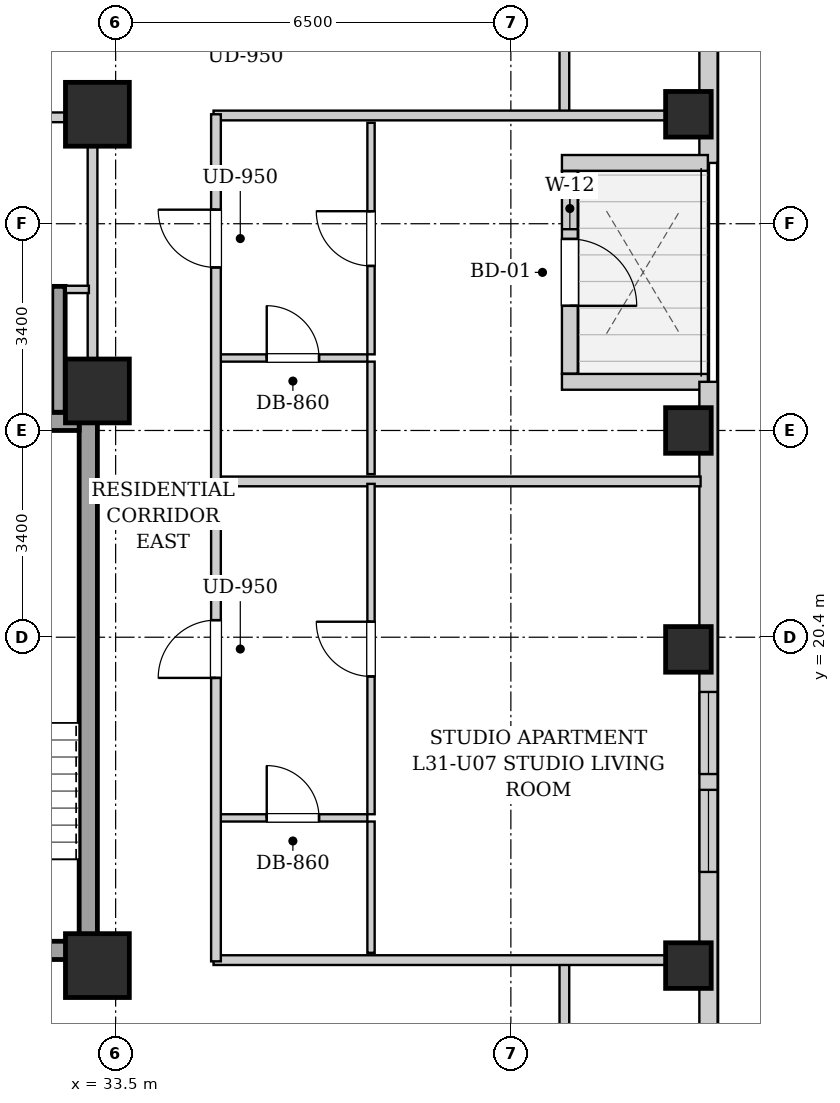
"""IFC4 building model, lengths in metres.
Left out: names, types, materials, properties, quantities, classifications, styles, units other than length and angle.
Written with IfcOpenShell. Run it as: python <this file> out.ifc"""

import sys

from ifc_helpers import new_model, si_unit, direction, frame, frame_2d, origin, origin_2d, place, context, subcontext, project, spatial, rectangle, extrude, element, fill, save


model = new_model("IFC4")
c1 = context("Model", 3, precision=1e-05, world=origin(), true_north=direction((0.0, 1.0)))
c2 = subcontext(c1, "Body", "Model", "MODEL_VIEW")
j1 = project(units=[si_unit("LENGTHUNIT", "METRE"), si_unit("PLANEANGLEUNIT", "RADIAN")], contexts=[c1])
p1 = place(None, origin())
s1 = spatial("IfcSite", under=j1, at=p1, CompositionType="ELEMENT")
p2 = place(p1, origin())
s2 = spatial("IfcBuilding", under=s1, at=p2, CompositionType="ELEMENT")
p3 = place(p2, frame((0.0, 0.0, 110.3)))
s3 = spatial("IfcBuildingStorey", under=s2, at=p3, CompositionType="ELEMENT", Elevation=110.3)
for number, where, z_axis, x_axis in (
    (1, (42.92, 15.0, 0.0), (0.0, 0.0, 1.0), (1.0, 0.0, 0.0)),
    (2, (42.92, 20.2, 0.0), (0.0, 0.0, 1.0), (1.0, 0.0, 0.0)),
    (3, (42.92, 23.8, 0.0), (0.0, 0.0, 1.0), (1.0, 0.0, 0.0)),
    (4, (42.92, 29.0, 0.0), (0.0, 0.0, 1.0), (1.0, 0.0, 0.0)),
):
    element("IfcColumn", number, at=place(p3, frame(where, z_axis=z_axis, x_axis=x_axis)), inside=s3, PredefinedType="COLUMN", context=c2, shape_type="SweptSolid", body=[
        extrude(rectangle(XDim=0.75, YDim=0.75, at=origin_2d()), origin(), (0.0, 0.0, 1.0), 3.2),
    ])
for number, where, z_axis, x_axis in (
    (5, (33.2, 15.0, 0.0), (0.0, 0.0, 1.0), (1.0, 0.0, 0.0)),
    (6, (33.2, 29.0, 0.0), (0.0, 0.0, 1.0), (1.0, 0.0, 0.0)),
    (7, (33.2, 24.45, 0.0), (0.0, 0.0, 1.0), (1.0, 0.0, 0.0)),
):
    element("IfcColumn", number, at=place(p3, frame(where, z_axis=z_axis, x_axis=x_axis)), inside=s3, PredefinedType="COLUMN", context=c2, shape_type="SweptSolid", body=[
        extrude(rectangle(XDim=1.05, YDim=1.05, at=origin_2d()), origin(), (0.0, 0.0, 1.0), 3.2),
    ])
p4 = place(p3, frame((43.25, 40.8, 0.0), z_axis=(0.0, 0.0, 1.0), x_axis=(0.0, -1.0, 0.0)))
e8 = element("IfcWall", 8, at=p4, inside=s3, PredefinedType="SOLIDWALL", context=c2, shape_type="SweptSolid", body=[
    extrude(rectangle(XDim=12.6, YDim=0.3, at=frame_2d((6.3, 0.0))), origin(), (0.0, 0.0, 1.0), 2.94),
])
p5 = place(p3, frame((43.24, 28.2, 0.0), z_axis=(0.0, 0.0, 1.0), x_axis=(-1.0, 0.0, 0.0)))
e9 = element("IfcWall", 9, at=p5, inside=s3, PredefinedType="SOLIDWALL", context=c2, shape_type="SweptSolid", body=[
    extrude(rectangle(XDim=2.4, YDim=0.26, at=frame_2d((1.2, 0.0))), origin(), (0.0, 0.0, 1.0), 2.94),
])
p6 = place(p3, frame((40.97, 28.066, 0.0), z_axis=(0.0, 0.0, 1.0), x_axis=(0.0, -1.0, 0.0)))
e10 = element("IfcWall", 10, at=p6, inside=s3, PredefinedType="SOLIDWALL", context=c2, shape_type="SweptSolid", body=[
    extrude(rectangle(XDim=3.332, YDim=0.26, at=frame_2d((1.666, 0.0))), origin(), (0.0, 0.0, 1.0), 2.94),
])
p7 = place(p6, frame((1.116, 0.0, 0.0)))
e11 = element("IfcOpeningElement", 11, at=p7, cuts=e10, PredefinedType="OPENING", context=c2, shape_type="SweptSolid", body=[
    extrude(rectangle(XDim=1.1, YDim=2.0, at=frame_2d((0.55, 1.0))), frame((0.0, 0.14, 0.0), z_axis=(0.0, -1.0, 0.0), x_axis=(1.0, 0.0, 0.0)), (0.0, 0.0, 1.0), 0.28),
])
p8 = place(p6, frame((0.276, 0.0, 0.55)))
e12 = element("IfcOpeningElement", 12, at=p8, cuts=e10, PredefinedType="OPENING", context=c2, shape_type="SweptSolid", body=[
    extrude(rectangle(XDim=0.68, YDim=1.2, at=frame_2d((0.34, 0.6))), frame((0.0, 0.14, 0.0), z_axis=(0.0, -1.0, 0.0), x_axis=(1.0, 0.0, 0.0)), (0.0, 0.0, 1.0), 0.28),
])
p9 = place(p3, frame((40.84, 24.6, 0.0), z_axis=(0.0, 0.0, 1.0), x_axis=(1.0, 0.0, 0.0)))
e13 = element("IfcWall", 13, at=p9, inside=s3, PredefinedType="SOLIDWALL", context=c2, shape_type="SweptSolid", body=[
    extrude(rectangle(XDim=2.4, YDim=0.26, at=frame_2d((1.2, 0.0))), origin(), (0.0, 0.0, 1.0), 2.94),
])
p10 = place(p3, frame((43.25, 24.6, 0.0), z_axis=(0.0, 0.0, 1.0), x_axis=(0.0, -1.0, 0.0)))
e14 = element("IfcWall", 14, at=p10, inside=s3, PredefinedType="SOLIDWALL", context=c2, shape_type="SweptSolid", body=[
    extrude(rectangle(XDim=22.1, YDim=0.3, at=frame_2d((11.05, 0.0))), origin(), (0.0, 0.0, 1.0), 2.94),
])
p11 = place(p10, frame((17.366, 0.0, 0.55)))
e15 = element("IfcOpeningElement", 15, at=p11, cuts=e14, PredefinedType="OPENING", context=c2, shape_type="SweptSolid", body=[
    extrude(rectangle(XDim=1.35, YDim=1.2, at=frame_2d((0.675, 0.6))), frame((0.0, 0.16, 0.0), z_axis=(0.0, -1.0, 0.0), x_axis=(1.0, 0.0, 0.0)), (0.0, 0.0, 1.0), 0.32),
])
p12 = place(p10, frame((15.535, 0.0, 0.55)))
e16 = element("IfcOpeningElement", 16, at=p12, cuts=e14, PredefinedType="OPENING", context=c2, shape_type="SweptSolid", body=[
    extrude(rectangle(XDim=1.35, YDim=1.2, at=frame_2d((0.675, 0.6))), frame((0.0, 0.16, 0.0), z_axis=(0.0, -1.0, 0.0), x_axis=(1.0, 0.0, 0.0)), (0.0, 0.0, 1.0), 0.32),
])
p13 = place(p10, frame((5.1, 0.0, 0.55)))
e17 = element("IfcOpeningElement", 17, at=p13, cuts=e14, PredefinedType="OPENING", context=c2, shape_type="SweptSolid", body=[
    extrude(rectangle(XDim=1.35, YDim=1.2, at=frame_2d((0.675, 0.6))), frame((0.0, 0.16, 0.0), z_axis=(0.0, -1.0, 0.0), x_axis=(1.0, 0.0, 0.0)), (0.0, 0.0, 1.0), 0.32),
])
p14 = place(p10, frame((6.71, 0.0, 0.55)))
e18 = element("IfcOpeningElement", 18, at=p14, cuts=e14, PredefinedType="OPENING", context=c2, shape_type="SweptSolid", body=[
    extrude(rectangle(XDim=1.35, YDim=1.2, at=frame_2d((0.675, 0.6))), frame((0.0, 0.16, 0.0), z_axis=(0.0, -1.0, 0.0), x_axis=(1.0, 0.0, 0.0)), (0.0, 0.0, 1.0), 0.32),
])
p15 = place(p3, frame((33.05, 15.1, 0.0), z_axis=(0.0, 0.0, 1.0), x_axis=(0.0, 1.0, 0.0)))
e19 = element("IfcWall", 19, at=p15, inside=s3, PredefinedType="SHEAR", context=c2, shape_type="SweptSolid", body=[
    extrude(rectangle(XDim=9.0, YDim=0.3, at=frame_2d((4.5, 0.0))), origin(), (0.0, 0.0, 1.0), 2.94),
])
p16 = place(p3, frame((30.05, 23.95, 0.0), z_axis=(0.0, 0.0, 1.0), x_axis=(1.0, 0.0, 0.0)))
e20 = element("IfcWall", 20, at=p16, inside=s3, PredefinedType="SHEAR", context=c2, shape_type="SweptSolid", body=[
    extrude(rectangle(XDim=2.85, YDim=0.3, at=frame_2d((1.425, 0.0))), origin(), (0.0, 0.0, 1.0), 2.94),
])
p17 = place(p3, frame((30.05, 15.25, 0.0), z_axis=(0.0, 0.0, 1.0), x_axis=(1.0, 0.0, 0.0)))
e21 = element("IfcWall", 21, at=p17, inside=s3, PredefinedType="SHEAR", context=c2, shape_type="SweptSolid", body=[
    extrude(rectangle(XDim=2.85, YDim=0.3, at=frame_2d((1.425, 0.0))), origin(), (0.0, 0.0, 1.0), 2.94),
])
p18 = place(p17, frame((0.86, 0.0, 0.0)))
e22 = element("IfcOpeningElement", 22, at=p18, cuts=e21, PredefinedType="OPENING", context=c2, shape_type="SweptSolid", body=[
    extrude(rectangle(XDim=1.1, YDim=2.05, at=frame_2d((0.55, 1.025))), frame((0.0, 0.16, 0.0), z_axis=(0.0, -1.0, 0.0), x_axis=(1.0, 0.0, 0.0)), (0.0, 0.0, 1.0), 0.32),
])
p19 = place(p3, frame((32.56, 24.1, 0.0), z_axis=(0.0, 0.0, 1.0), x_axis=(0.0, 1.0, 0.0)))
e23 = element("IfcWall", 23, at=p19, inside=s3, PredefinedType="SHEAR", context=c2, shape_type="SweptSolid", body=[
    extrude(rectangle(XDim=2.07, YDim=0.22, at=frame_2d((1.035, 0.0))), origin(), (0.0, 0.0, 1.0), 2.94),
])
p20 = place(p3, frame((33.12, 24.12, 0.0), z_axis=(0.0, 0.0, 1.0), x_axis=(0.0, 1.0, 0.0)))
e24 = element("IfcWall", 24, at=p20, inside=s3, PredefinedType="PARTITIONING", context=c2, shape_type="SweptSolid", body=[
    extrude(rectangle(XDim=4.76, YDim=0.16, at=frame_2d((2.38, 0.0))), origin(), (0.0, 0.0, 1.0), 2.94),
])
p21 = place(p3, frame((32.68, 26.12, 0.0), z_axis=(0.0, 0.0, 1.0), x_axis=(1.0, 0.0, 0.0)))
e25 = element("IfcWall", 25, at=p21, inside=s3, PredefinedType="PARTITIONING", context=c2, shape_type="SweptSolid", body=[
    extrude(rectangle(XDim=0.38, YDim=0.12, at=frame_2d((0.19, 0.0))), origin(), (0.0, 0.0, 1.0), 2.94),
])
p22 = place(p3, frame((30.08, 28.95, 0.0), z_axis=(0.0, 0.0, 1.0), x_axis=(1.0, 0.0, 0.0)))
e26 = element("IfcWall", 26, at=p22, inside=s3, PredefinedType="PARTITIONING", context=c2, shape_type="SweptSolid", body=[
    extrude(rectangle(XDim=2.96, YDim=0.16, at=frame_2d((1.48, 0.0))), origin(), (0.0, 0.0, 1.0), 2.94),
])
p23 = place(p22, frame((0.695, 0.0, 0.0)))
e27 = element("IfcOpeningElement", 27, at=p23, cuts=e26, PredefinedType="OPENING", context=c2, shape_type="SweptSolid", body=[
    extrude(rectangle(XDim=0.86, YDim=2.05, at=frame_2d((0.43, 1.025))), frame((0.0, 0.09, 0.0), z_axis=(0.0, -1.0, 0.0), x_axis=(1.0, 0.0, 0.0)), (0.0, 0.0, 1.0), 0.18),
])
for number, where, z_axis, x_axis in (
    (28, (40.88, 13.35, 0.0), (0.0, 0.0, 1.0), (0.0, 1.0, 0.0)),
    (29, (40.88, 28.98, 0.0), (0.0, 0.0, 1.0), (0.0, 1.0, 0.0)),
):
    element("IfcWall", number, at=place(p3, frame(where, z_axis=z_axis, x_axis=x_axis)), inside=s3, PredefinedType="PARTITIONING", context=c2, shape_type="SweptSolid", body=[
        extrude(rectangle(XDim=1.74, YDim=0.16, at=frame_2d((0.87, 0.0))), origin(), (0.0, 0.0, 1.0), 2.94),
    ])
for number, where, z_axis, x_axis in (
    (30, (35.11, 15.09, 0.0), (0.0, 0.0, 1.0), (1.0, 0.0, 0.0)),
    (31, (35.11, 28.98, 0.0), (0.0, 0.0, 1.0), (1.0, 0.0, 0.0)),
):
    element("IfcWall", number, at=place(p3, frame(where, z_axis=z_axis, x_axis=x_axis)), inside=s3, PredefinedType="PARTITIONING", context=c2, shape_type="SweptSolid", body=[
        extrude(rectangle(XDim=8.01, YDim=0.16, at=frame_2d((4.005, 0.0))), origin(), (0.0, 0.0, 1.0), 2.313),
    ])
p24 = place(p3, frame((35.19, 22.962, 0.0), z_axis=(0.0, 0.0, 1.0), x_axis=(1.0, 0.0, 0.0)))
e32 = element("IfcWall", 32, at=p24, inside=s3, PredefinedType="PARTITIONING", context=c2, shape_type="SweptSolid", body=[
    extrude(rectangle(XDim=7.93, YDim=0.16, at=frame_2d((3.965, 0.0))), origin(), (0.0, 0.0, 1.0), 2.94),
])
p25 = place(p3, frame((35.19, 17.429, 0.0), z_axis=(0.0, 0.0, 1.0), x_axis=(1.0, 0.0, 0.0)))
e33 = element("IfcWall", 33, at=p25, inside=s3, PredefinedType="PARTITIONING", context=c2, shape_type="SweptSolid", body=[
    extrude(rectangle(XDim=2.45, YDim=0.12, at=frame_2d((1.225, 0.0))), origin(), (0.0, 0.0, 1.0), 2.94),
])
p26 = place(p25, frame((0.795, 0.0, 0.0)))
e34 = element("IfcOpeningElement", 34, at=p26, cuts=e33, PredefinedType="OPENING", context=c2, shape_type="SweptSolid", body=[
    extrude(rectangle(XDim=0.86, YDim=2.05, at=frame_2d((0.43, 1.025))), frame((0.0, 0.07, 0.0), z_axis=(0.0, -1.0, 0.0), x_axis=(1.0, 0.0, 0.0)), (0.0, 0.0, 1.0), 0.14),
])
p27 = place(p3, frame((37.7, 15.21, 0.0), z_axis=(0.0, 0.0, 1.0), x_axis=(0.0, 1.0, 0.0)))
e35 = element("IfcWall", 35, at=p27, inside=s3, PredefinedType="PARTITIONING", context=c2, shape_type="SweptSolid", body=[
    extrude(rectangle(XDim=2.159, YDim=0.12, at=frame_2d((1.08, 0.0))), origin(), (0.0, 0.0, 1.0), 2.94),
])
p28 = place(p3, frame((37.7, 17.489, 0.0), z_axis=(0.0, 0.0, 1.0), x_axis=(0.0, 1.0, 0.0)))
e36 = element("IfcWall", 36, at=p28, inside=s3, PredefinedType="PARTITIONING", context=c2, shape_type="SweptSolid", body=[
    extrude(rectangle(XDim=5.433, YDim=0.12, at=frame_2d((2.717, 0.0))), origin(), (0.0, 0.0, 1.0), 2.94),
])
p29 = place(p28, frame((2.266, 0.0, 0.0)))
e37 = element("IfcOpeningElement", 37, at=p29, cuts=e36, PredefinedType="OPENING", context=c2, shape_type="SweptSolid", body=[
    extrude(rectangle(XDim=0.9, YDim=2.05, at=frame_2d((0.45, 1.025))), frame((0.0, 0.07, 0.0), z_axis=(0.0, -1.0, 0.0), x_axis=(1.0, 0.0, 0.0)), (0.0, 0.0, 1.0), 0.14),
])
p30 = place(p3, frame((35.19, 24.992, 0.0), z_axis=(0.0, 0.0, 1.0), x_axis=(1.0, 0.0, 0.0)))
e38 = element("IfcWall", 38, at=p30, inside=s3, PredefinedType="PARTITIONING", context=c2, shape_type="SweptSolid", body=[
    extrude(rectangle(XDim=2.45, YDim=0.12, at=frame_2d((1.225, 0.0))), origin(), (0.0, 0.0, 1.0), 2.94),
])
p31 = place(p30, frame((0.795, 0.0, 0.0)))
e39 = element("IfcOpeningElement", 39, at=p31, cuts=e38, PredefinedType="OPENING", context=c2, shape_type="SweptSolid", body=[
    extrude(rectangle(XDim=0.86, YDim=2.05, at=frame_2d((0.43, 1.025))), frame((0.0, 0.07, 0.0), z_axis=(0.0, -1.0, 0.0), x_axis=(1.0, 0.0, 0.0)), (0.0, 0.0, 1.0), 0.14),
])
p32 = place(p3, frame((37.7, 23.082, 0.0), z_axis=(0.0, 0.0, 1.0), x_axis=(0.0, 1.0, 0.0)))
e40 = element("IfcWall", 40, at=p32, inside=s3, PredefinedType="PARTITIONING", context=c2, shape_type="SweptSolid", body=[
    extrude(rectangle(XDim=1.85, YDim=0.12, at=frame_2d((0.925, 0.0))), origin(), (0.0, 0.0, 1.0), 2.94),
])
p33 = place(p3, frame((37.7, 25.052, 0.0), z_axis=(0.0, 0.0, 1.0), x_axis=(0.0, 1.0, 0.0)))
e41 = element("IfcWall", 41, at=p33, inside=s3, PredefinedType="PARTITIONING", context=c2, shape_type="SweptSolid", body=[
    extrude(rectangle(XDim=3.808, YDim=0.12, at=frame_2d((1.904, 0.0))), origin(), (0.0, 0.0, 1.0), 2.94),
])
p34 = place(p33, frame((1.454, 0.0, 0.0)))
e42 = element("IfcOpeningElement", 42, at=p34, cuts=e41, PredefinedType="OPENING", context=c2, shape_type="SweptSolid", body=[
    extrude(rectangle(XDim=0.9, YDim=2.05, at=frame_2d((0.45, 1.025))), frame((0.0, 0.07, 0.0), z_axis=(0.0, -1.0, 0.0), x_axis=(1.0, 0.0, 0.0)), (0.0, 0.0, 1.0), 0.14),
])
p35 = place(p3, frame((35.15, 15.07, 0.0), z_axis=(0.0, 0.0, 1.0), x_axis=(0.0, 1.0, 0.0)))
e43 = element("IfcWall", 43, at=p35, inside=s3, PredefinedType="PARTITIONING", context=c2, shape_type="SweptSolid", body=[
    extrude(rectangle(XDim=13.93, YDim=0.16, at=frame_2d((6.965, 0.0))), origin(), (0.0, 0.0, 1.0), 2.94),
])
p36 = place(p35, frame((4.661, 0.0, 0.0)))
e44 = element("IfcOpeningElement", 44, at=p36, cuts=e43, PredefinedType="OPENING", context=c2, shape_type="SweptSolid", body=[
    extrude(rectangle(XDim=0.95, YDim=2.1, at=frame_2d((0.475, 1.05))), frame((0.0, 0.09, 0.0), z_axis=(0.0, -1.0, 0.0), x_axis=(1.0, 0.0, 0.0)), (0.0, 0.0, 1.0), 0.18),
])
p37 = place(p35, frame((11.411, 0.0, 0.0)))
e45 = element("IfcOpeningElement", 45, at=p37, cuts=e43, PredefinedType="OPENING", context=c2, shape_type="SweptSolid", body=[
    extrude(rectangle(XDim=0.95, YDim=2.1, at=frame_2d((0.475, 1.05))), frame((0.0, 0.09, 0.0), z_axis=(0.0, -1.0, 0.0), x_axis=(1.0, 0.0, 0.0)), (0.0, 0.0, 1.0), 0.18),
])
p38 = place(p26, origin())
e46 = element("IfcDoor", 46, at=p38, inside=s3, OperationType="SINGLE_SWING_LEFT", PredefinedType="DOOR", context=c2, shape_type="SweptSolid", body=[
    extrude(rectangle(XDim=0.86, YDim=2.05, at=frame_2d((0.43, 1.025))), frame((0.0, 0.025, 0.0), z_axis=(0.0, -1.0, 0.0), x_axis=(1.0, 0.0, 0.0)), (0.0, 0.0, 1.0), 0.05),
])
fill(e34, e46)
p39 = place(p29, origin())
e47 = element("IfcDoor", 47, at=p39, inside=s3, OperationType="SINGLE_SWING_RIGHT", PredefinedType="DOOR", context=c2, shape_type="SweptSolid", body=[
    extrude(rectangle(XDim=0.9, YDim=2.05, at=frame_2d((0.45, 1.025))), frame((0.0, 0.025, 0.0), z_axis=(0.0, -1.0, 0.0), x_axis=(1.0, 0.0, 0.0)), (0.0, 0.0, 1.0), 0.05),
])
fill(e37, e47)
p40 = place(p31, origin())
e48 = element("IfcDoor", 48, at=p40, inside=s3, OperationType="SINGLE_SWING_LEFT", PredefinedType="DOOR", context=c2, shape_type="SweptSolid", body=[
    extrude(rectangle(XDim=0.86, YDim=2.05, at=frame_2d((0.43, 1.025))), frame((0.0, 0.025, 0.0), z_axis=(0.0, -1.0, 0.0), x_axis=(1.0, 0.0, 0.0)), (0.0, 0.0, 1.0), 0.05),
])
fill(e39, e48)
p41 = place(p34, origin())
e49 = element("IfcDoor", 49, at=p41, inside=s3, OperationType="SINGLE_SWING_RIGHT", PredefinedType="DOOR", context=c2, shape_type="SweptSolid", body=[
    extrude(rectangle(XDim=0.9, YDim=2.05, at=frame_2d((0.45, 1.025))), frame((0.0, 0.025, 0.0), z_axis=(0.0, -1.0, 0.0), x_axis=(1.0, 0.0, 0.0)), (0.0, 0.0, 1.0), 0.05),
])
fill(e42, e49)
p42 = place(p36, origin())
e50 = element("IfcDoor", 50, at=p42, inside=s3, OperationType="SINGLE_SWING_LEFT", PredefinedType="DOOR", context=c2, shape_type="SweptSolid", body=[
    extrude(rectangle(XDim=0.95, YDim=2.1, at=frame_2d((0.475, 1.05))), frame((0.0, 0.025, 0.0), z_axis=(0.0, -1.0, 0.0), x_axis=(1.0, 0.0, 0.0)), (0.0, 0.0, 1.0), 0.05),
])
fill(e44, e50)
p43 = place(p37, origin())
e51 = element("IfcDoor", 51, at=p43, inside=s3, OperationType="SINGLE_SWING_RIGHT", PredefinedType="DOOR", context=c2, shape_type="SweptSolid", body=[
    extrude(rectangle(XDim=0.95, YDim=2.1, at=frame_2d((0.475, 1.05))), frame((0.0, 0.025, 0.0), z_axis=(0.0, -1.0, 0.0), x_axis=(1.0, 0.0, 0.0)), (0.0, 0.0, 1.0), 0.05),
])
fill(e45, e51)
p44 = place(p7, origin())
e52 = element("IfcDoor", 52, at=p44, inside=s3, OperationType="SINGLE_SWING_RIGHT", PredefinedType="DOOR", context=c2, shape_type="SweptSolid", body=[
    extrude(rectangle(XDim=1.1, YDim=2.0, at=frame_2d((0.55, 1.0))), frame((0.0, 0.025, 0.0), z_axis=(0.0, -1.0, 0.0), x_axis=(1.0, 0.0, 0.0)), (0.0, 0.0, 1.0), 0.05),
])
fill(e11, e52)
p45 = place(p13, origin())
e53 = element("IfcWindow", 53, at=p45, inside=s3, PartitioningType="SINGLE_PANEL", PredefinedType="WINDOW", context=c2, shape_type="SweptSolid", body=[
    extrude(rectangle(XDim=1.35, YDim=1.2, at=frame_2d((0.675, 0.6))), frame((0.0, 0.03, 0.0), z_axis=(0.0, -1.0, 0.0), x_axis=(1.0, 0.0, 0.0)), (0.0, 0.0, 1.0), 0.06),
])
fill(e17, e53)
p46 = place(p14, origin())
e54 = element("IfcWindow", 54, at=p46, inside=s3, PartitioningType="SINGLE_PANEL", PredefinedType="WINDOW", context=c2, shape_type="SweptSolid", body=[
    extrude(rectangle(XDim=1.35, YDim=1.2, at=frame_2d((0.675, 0.6))), frame((0.0, 0.03, 0.0), z_axis=(0.0, -1.0, 0.0), x_axis=(1.0, 0.0, 0.0)), (0.0, 0.0, 1.0), 0.06),
])
fill(e18, e54)
p47 = place(p8, origin())
e55 = element("IfcWindow", 55, at=p47, inside=s3, PartitioningType="SINGLE_PANEL", PredefinedType="WINDOW", context=c2, shape_type="SweptSolid", body=[
    extrude(rectangle(XDim=0.68, YDim=1.2, at=frame_2d((0.34, 0.6))), frame((0.0, 0.03, 0.0), z_axis=(0.0, -1.0, 0.0), x_axis=(1.0, 0.0, 0.0)), (0.0, 0.0, 1.0), 0.06),
])
fill(e12, e55)
save(model, sys.argv[1])
